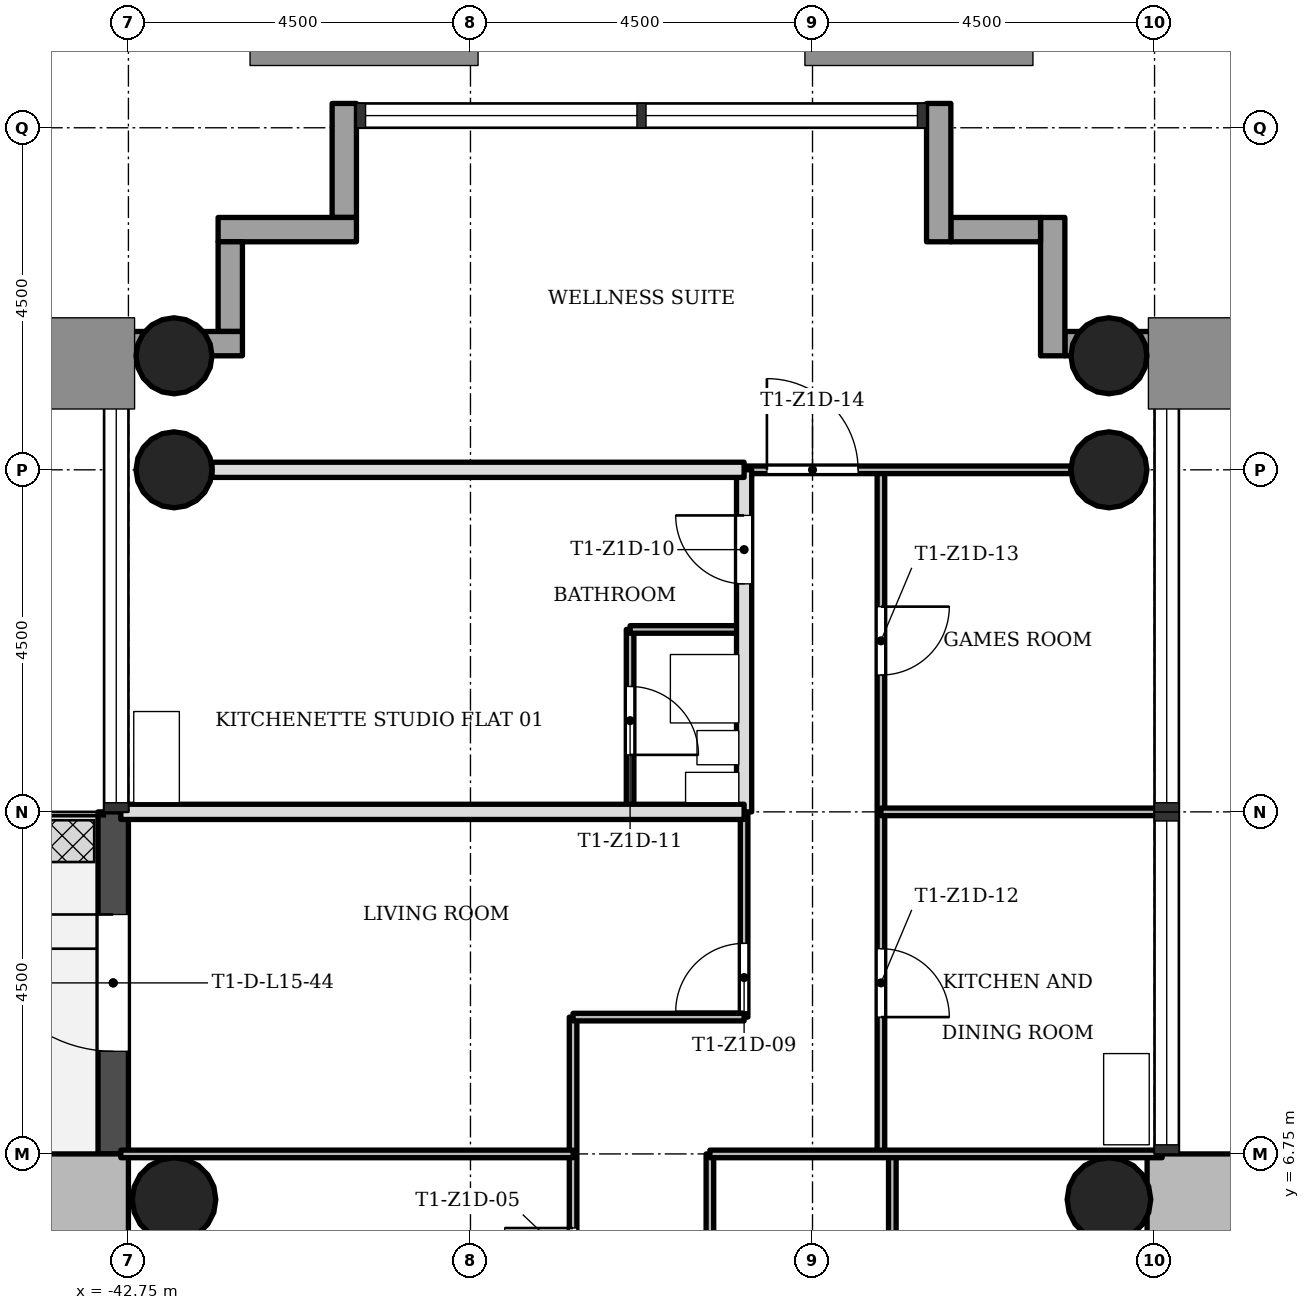
"""IFC4 building model, lengths in metres.
Left out: names, types, materials, properties, quantities, classifications, styles, units other than length and angle.
Written with IfcOpenShell. Run it as: python <this file> out.ifc"""

import sys

from ifc_helpers import new_model, si_unit, direction, frame, frame_2d, origin, origin_2d, place, context, subcontext, project, spatial, rectangle, hollow_circle, extrude, element, fill, save


model = new_model("IFC4")
c1 = context("Model", 3, precision=1e-05, world=origin(), true_north=direction((0.0, 1.0)))
c2 = subcontext(c1, "Body", "Model", "MODEL_VIEW")
j1 = project(units=[si_unit("LENGTHUNIT", "METRE"), si_unit("PLANEANGLEUNIT", "RADIAN")], contexts=[c1])
p1 = place(None, origin())
s1 = spatial("IfcSite", under=j1, at=p1, CompositionType="ELEMENT")
p2 = place(p1, origin())
s2 = spatial("IfcBuilding", under=s1, at=p2, CompositionType="ELEMENT")
p3 = place(p2, frame((0.0, 0.0, 58.5)))
s3 = spatial("IfcBuildingStorey", under=s2, at=p3, CompositionType="ELEMENT", Elevation=58.5)
p4 = place(p3, frame((-21.35, 6.2, 0.0), z_axis=(0.0, 0.0, 1.0), x_axis=(-1.0, 0.0, 0.0)))
e1 = element("IfcWall", 1, at=p4, inside=s3, PredefinedType="SHEAR", context=c2, shape_type="SweptSolid", body=[
    extrude(rectangle(XDim=7.998, YDim=1.1, at=frame_2d((3.999, 0.0))), origin(), (0.0, 0.0, 1.0), 3.4),
])
p5 = place(p3, frame((-43.3, -5.65, 0.0), z_axis=(0.0, 0.0, 1.0), x_axis=(0.0, 1.0, 0.0)))
e2 = element("IfcWall", 2, at=p5, inside=s3, PredefinedType="SHEAR", context=c2, shape_type="SweptSolid", body=[
    extrude(rectangle(XDim=12.4, YDim=1.1, at=frame_2d((6.2, 0.0))), origin(), (0.0, 0.0, 1.0), 3.4),
])
p6 = place(p5, frame((4.75, 0.0, 0.0)))
e3 = element("IfcOpeningElement", 3, at=p6, cuts=e2, PredefinedType="OPENING", context=c2, shape_type="SweptSolid", body=[
    extrude(rectangle(XDim=1.8, YDim=2.1, at=frame_2d((0.9, 1.05))), frame((0.0, 0.56, 0.0), z_axis=(0.0, -1.0, 0.0), x_axis=(1.0, 0.0, 0.0)), (0.0, 0.0, 1.0), 1.12),
])
for number, where, z_axis, x_axis in (
    (4, (-29.85, 15.75, 0.0), (0.0, 0.0, 1.0), (1.0, 0.0, 0.0)),
    (5, (-42.15, 15.75, 0.0), (0.0, 0.0, 1.0), (1.0, 0.0, 0.0)),
    (6, (-29.85, 17.25, 0.0), (0.0, 0.0, 1.0), (1.0, 0.0, 0.0)),
    (7, (-42.15, 17.25, 0.0), (0.0, 0.0, 1.0), (1.0, 0.0, 0.0)),
):
    element("IfcColumn", number, at=place(p3, frame(where, z_axis=z_axis, x_axis=x_axis)), inside=s3, PredefinedType="COLUMN", context=c2, shape_type="SweptSolid", body=[
        extrude(hollow_circle(Radius=0.5, WallThickness=0.036, at=origin_2d()), origin(), (0.0, 0.0, 1.0), 3.4),
    ])
for number, where, z_axis, x_axis in (
    (8, (-29.85, 6.15, 0.0), (0.0, 0.0, 1.0), (1.0, 0.0, 0.0)),
    (9, (-42.15, 6.15, 0.0), (0.0, 0.0, 1.0), (1.0, 0.0, 0.0)),
):
    element("IfcColumn", number, at=place(p3, frame(where, z_axis=z_axis, x_axis=x_axis)), inside=s3, PredefinedType="COLUMN", context=c2, shape_type="SweptSolid", body=[
        extrude(hollow_circle(Radius=0.55, WallThickness=0.04, at=origin_2d()), origin(), (0.0, 0.0, 1.0), 3.4),
    ])
p7 = place(p3, frame((-28.93, 17.41, -0.3), z_axis=(0.0, 0.0, 1.0), x_axis=(-1.0, 0.0, 0.0)))
e10 = element("IfcWall", 10, at=p7, inside=s3, PredefinedType="STANDARD", context=c2, shape_type="SweptSolid", body=[
    extrude(rectangle(XDim=1.5, YDim=0.32, at=frame_2d((0.75, 0.0))), origin(), (0.0, 0.0, 1.0), 3.4),
])
p8 = place(p3, frame((-30.59, 17.25, -0.3), z_axis=(0.0, 0.0, 1.0), x_axis=(0.0, 1.0, 0.0)))
e11 = element("IfcWall", 11, at=p8, inside=s3, PredefinedType="STANDARD", context=c2, shape_type="SweptSolid", body=[
    extrude(rectangle(XDim=1.82, YDim=0.32, at=frame_2d((0.91, 0.0))), origin(), (0.0, 0.0, 1.0), 3.4),
])
p9 = place(p3, frame((-30.75, 18.91, -0.3), z_axis=(0.0, 0.0, 1.0), x_axis=(-1.0, 0.0, 0.0)))
e12 = element("IfcWall", 12, at=p9, inside=s3, PredefinedType="STANDARD", context=c2, shape_type="SweptSolid", body=[
    extrude(rectangle(XDim=1.18, YDim=0.32, at=frame_2d((0.59, 0.0))), origin(), (0.0, 0.0, 1.0), 3.4),
])
p10 = place(p3, frame((-32.09, 18.75, -0.3), z_axis=(0.0, 0.0, 1.0), x_axis=(0.0, 1.0, 0.0)))
e13 = element("IfcWall", 13, at=p10, inside=s3, PredefinedType="STANDARD", context=c2, shape_type="SweptSolid", body=[
    extrude(rectangle(XDim=1.82, YDim=0.32, at=frame_2d((0.91, 0.0))), origin(), (0.0, 0.0, 1.0), 3.4),
])
p11 = place(p3, frame((-39.91, 20.57, -0.3), z_axis=(0.0, 0.0, 1.0), x_axis=(0.0, -1.0, 0.0)))
e14 = element("IfcWall", 14, at=p11, inside=s3, PredefinedType="STANDARD", context=c2, shape_type="SweptSolid", body=[
    extrude(rectangle(XDim=1.5, YDim=0.32, at=frame_2d((0.75, 0.0))), origin(), (0.0, 0.0, 1.0), 3.4),
])
p12 = place(p3, frame((-39.75, 18.91, -0.3), z_axis=(0.0, 0.0, 1.0), x_axis=(-1.0, 0.0, 0.0)))
e15 = element("IfcWall", 15, at=p12, inside=s3, PredefinedType="STANDARD", context=c2, shape_type="SweptSolid", body=[
    extrude(rectangle(XDim=1.82, YDim=0.32, at=frame_2d((0.91, 0.0))), origin(), (0.0, 0.0, 1.0), 3.4),
])
p13 = place(p3, frame((-41.41, 18.75, -0.3), z_axis=(0.0, 0.0, 1.0), x_axis=(0.0, -1.0, 0.0)))
e16 = element("IfcWall", 16, at=p13, inside=s3, PredefinedType="STANDARD", context=c2, shape_type="SweptSolid", body=[
    extrude(rectangle(XDim=1.18, YDim=0.32, at=frame_2d((0.59, 0.0))), origin(), (0.0, 0.0, 1.0), 3.4),
])
p14 = place(p3, frame((-41.25, 17.41, -0.3), z_axis=(0.0, 0.0, 1.0), x_axis=(-1.0, 0.0, 0.0)))
e17 = element("IfcWall", 17, at=p14, inside=s3, PredefinedType="STANDARD", context=c2, shape_type="SweptSolid", body=[
    extrude(rectangle(XDim=1.82, YDim=0.32, at=frame_2d((0.91, 0.0))), origin(), (0.0, 0.0, 1.0), 3.4),
])
p15 = place(p3, frame((-42.95, 11.25, -0.02), z_axis=(0.0, 0.0, 1.0), x_axis=(0.0, -1.0, 0.0)))
e18 = element("IfcWall", 18, at=p15, inside=s3, PredefinedType="STANDARD", context=c2, shape_type="SweptSolid", body=[
    extrude(rectangle(XDim=4.5, YDim=0.4, at=frame_2d((2.25, 0.0))), origin(), (0.0, 0.0, 1.0), 3.12),
])
p16 = place(p15, frame((1.35, 0.0, 0.02)))
e19 = element("IfcOpeningElement", 19, at=p16, cuts=e18, PredefinedType="OPENING", context=c2, shape_type="SweptSolid", body=[
    extrude(rectangle(XDim=1.8, YDim=2.1, at=frame_2d((0.9, 1.05))), frame((0.0, 0.21, 0.0), z_axis=(0.0, -1.0, 0.0), x_axis=(1.0, 0.0, 0.0)), (0.0, 0.0, 1.0), 0.42),
])
p17 = place(p3, frame((-36.9, 1.5, 0.0), z_axis=(0.0, 0.0, 1.0), x_axis=(0.0, 1.0, 0.0)))
e20 = element("IfcWall", 20, at=p17, inside=s3, PredefinedType="PARTITIONING", context=c2, shape_type="SweptSolid", body=[
    extrude(rectangle(XDim=7.05, YDim=0.1, at=frame_2d((3.525, 0.0))), origin(), (0.0, 0.0, 1.0), 3.0),
])
p18 = place(p17, frame((0.75, 0.0, 0.0)))
e21 = element("IfcOpeningElement", 21, at=p18, cuts=e20, PredefinedType="OPENING", context=c2, shape_type="SweptSolid", body=[
    extrude(rectangle(XDim=0.9, YDim=2.1, at=frame_2d((0.45, 1.05))), frame((0.0, 0.06, 0.0), z_axis=(0.0, -1.0, 0.0), x_axis=(1.0, 0.0, 0.0)), (0.0, 0.0, 1.0), 0.12),
])
p19 = place(p17, frame((3.375, 0.0, 0.0)))
e22 = element("IfcOpeningElement", 22, at=p19, cuts=e20, PredefinedType="OPENING", context=c2, shape_type="SweptSolid", body=[
    extrude(rectangle(XDim=0.9, YDim=2.1, at=frame_2d((0.45, 1.05))), frame((0.0, 0.06, 0.0), z_axis=(0.0, -1.0, 0.0), x_axis=(1.0, 0.0, 0.0)), (0.0, 0.0, 1.0), 0.12),
])
p20 = place(p3, frame((-36.15, 11.25, 0.0), z_axis=(0.0, 0.0, 1.0), x_axis=(0.0, 1.0, 0.0)))
e23 = element("IfcWall", 23, at=p20, inside=s3, PredefinedType="PARTITIONING", context=c2, shape_type="SweptSolid", body=[
    extrude(rectangle(XDim=2.4, YDim=0.1, at=frame_2d((1.2, 0.0))), origin(), (0.0, 0.0, 1.0), 3.0),
])
p21 = place(p20, frame((0.75, 0.0, 0.0)))
e24 = element("IfcOpeningElement", 24, at=p21, cuts=e23, PredefinedType="OPENING", context=c2, shape_type="SweptSolid", body=[
    extrude(rectangle(XDim=0.9, YDim=2.1, at=frame_2d((0.45, 1.05))), frame((0.0, 0.06, 0.0), z_axis=(0.0, -1.0, 0.0), x_axis=(1.0, 0.0, 0.0)), (0.0, 0.0, 1.0), 0.12),
])
p22 = place(p3, frame((-35.1, 1.5, 0.0), z_axis=(0.0, 0.0, 1.0), x_axis=(0.0, 1.0, 0.0)))
e25 = element("IfcWall", 25, at=p22, inside=s3, PredefinedType="PARTITIONING", context=c2, shape_type="SweptSolid", body=[
    extrude(rectangle(XDim=5.25, YDim=0.1, at=frame_2d((2.625, 0.0))), origin(), (0.0, 0.0, 1.0), 3.0),
])
p23 = place(p22, frame((2.175, 0.0, 0.0)))
e26 = element("IfcOpeningElement", 26, at=p23, cuts=e25, PredefinedType="OPENING", context=c2, shape_type="SweptSolid", body=[
    extrude(rectangle(XDim=0.9, YDim=2.1, at=frame_2d((0.45, 1.05))), frame((0.0, 0.06, 0.0), z_axis=(0.0, -1.0, 0.0), x_axis=(1.0, 0.0, 0.0)), (0.0, 0.0, 1.0), 0.12),
])
p24 = place(p3, frame((-34.65, 8.55, 0.0), z_axis=(0.0, 0.0, 1.0), x_axis=(0.0, 1.0, 0.0)))
e27 = element("IfcWall", 27, at=p24, inside=s3, PredefinedType="PARTITIONING", context=c2, shape_type="SweptSolid", body=[
    extrude(rectangle(XDim=2.7, YDim=0.1, at=frame_2d((1.35, 0.0))), origin(), (0.0, 0.0, 1.0), 3.0),
])
p25 = place(p24, frame((0.07, 0.0, 0.0)))
e28 = element("IfcOpeningElement", 28, at=p25, cuts=e27, PredefinedType="OPENING", context=c2, shape_type="SweptSolid", body=[
    extrude(rectangle(XDim=0.9, YDim=2.1, at=frame_2d((0.45, 1.05))), frame((0.0, 0.06, 0.0), z_axis=(0.0, -1.0, 0.0), x_axis=(1.0, 0.0, 0.0)), (0.0, 0.0, 1.0), 0.12),
])
p26 = place(p3, frame((-34.65, 11.25, 0.0), z_axis=(0.0, 0.0, 1.0), x_axis=(0.0, 1.0, 0.0)))
e29 = element("IfcWall", 29, at=p26, inside=s3, PredefinedType="SOLIDWALL", context=c2, shape_type="SweptSolid", body=[
    extrude(rectangle(XDim=4.5, YDim=0.2, at=frame_2d((2.25, 0.0))), origin(), (0.0, 0.0, 1.0), 3.0),
])
p27 = place(p26, frame((3.0, 0.0, 0.0)))
e30 = element("IfcOpeningElement", 30, at=p27, cuts=e29, PredefinedType="OPENING", context=c2, shape_type="SweptSolid", body=[
    extrude(rectangle(XDim=0.9, YDim=2.1, at=frame_2d((0.45, 1.05))), frame((0.0, 0.11, 0.0), z_axis=(0.0, -1.0, 0.0), x_axis=(1.0, 0.0, 0.0)), (0.0, 0.0, 1.0), 0.22),
])
p28 = place(p3, frame((-32.85, 6.75, 0.0), z_axis=(0.0, 0.0, 1.0), x_axis=(0.0, 1.0, 0.0)))
e31 = element("IfcWall", 31, at=p28, inside=s3, PredefinedType="PARTITIONING", context=c2, shape_type="SweptSolid", body=[
    extrude(rectangle(XDim=9.0, YDim=0.1, at=frame_2d((4.5, 0.0))), origin(), (0.0, 0.0, 1.0), 3.0),
])
p29 = place(p28, frame((1.8, 0.0, 0.0)))
e32 = element("IfcOpeningElement", 32, at=p29, cuts=e31, PredefinedType="OPENING", context=c2, shape_type="SweptSolid", body=[
    extrude(rectangle(XDim=0.9, YDim=2.1, at=frame_2d((0.45, 1.05))), frame((0.0, 0.06, 0.0), z_axis=(0.0, -1.0, 0.0), x_axis=(1.0, 0.0, 0.0)), (0.0, 0.0, 1.0), 0.12),
])
p30 = place(p28, frame((6.3, 0.0, 0.0)))
e33 = element("IfcOpeningElement", 33, at=p30, cuts=e31, PredefinedType="OPENING", context=c2, shape_type="SweptSolid", body=[
    extrude(rectangle(XDim=0.9, YDim=2.1, at=frame_2d((0.45, 1.05))), frame((0.0, 0.06, 0.0), z_axis=(0.0, -1.0, 0.0), x_axis=(1.0, 0.0, 0.0)), (0.0, 0.0, 1.0), 0.12),
])
p31 = place(p3, frame((-32.7, 1.5, 0.0), z_axis=(0.0, 0.0, 1.0), x_axis=(0.0, 1.0, 0.0)))
e34 = element("IfcWall", 34, at=p31, inside=s3, PredefinedType="PARTITIONING", context=c2, shape_type="SweptSolid", body=[
    extrude(rectangle(XDim=5.25, YDim=0.1, at=frame_2d((2.625, 0.0))), origin(), (0.0, 0.0, 1.0), 3.0),
])
for number, where, z_axis, x_axis in (
    (35, (-42.85, 6.75, 0.0), (0.0, 0.0, 1.0), (1.0, 0.0, 0.0)),
    (36, (-35.1, 6.75, 0.0), (0.0, 0.0, 1.0), (1.0, 0.0, 0.0)),
):
    element("IfcWall", number, at=place(p3, frame(where, z_axis=z_axis, x_axis=x_axis)), inside=s3, PredefinedType="PARTITIONING", context=c2, shape_type="SweptSolid", body=[
        extrude(rectangle(XDim=5.95, YDim=0.1, at=frame_2d((2.975, 0.0))), origin(), (0.0, 0.0, 1.0), 3.0),
    ])
p32 = place(p3, frame((-36.9, 8.55, 0.0), z_axis=(0.0, 0.0, 1.0), x_axis=(1.0, 0.0, 0.0)))
e37 = element("IfcWall", 37, at=p32, inside=s3, PredefinedType="PARTITIONING", context=c2, shape_type="SweptSolid", body=[
    extrude(rectangle(XDim=2.25, YDim=0.1, at=frame_2d((1.125, 0.0))), origin(), (0.0, 0.0, 1.0), 3.0),
])
p33 = place(p3, frame((-32.85, 11.25, 0.0), z_axis=(0.0, 0.0, 1.0), x_axis=(1.0, 0.0, 0.0)))
e38 = element("IfcWall", 38, at=p33, inside=s3, PredefinedType="PARTITIONING", context=c2, shape_type="SweptSolid", body=[
    extrude(rectangle(XDim=3.7, YDim=0.1, at=frame_2d((1.85, 0.0))), origin(), (0.0, 0.0, 1.0), 3.0),
])
p34 = place(p3, frame((-42.85, 11.25, 0.0), z_axis=(0.0, 0.0, 1.0), x_axis=(1.0, 0.0, 0.0)))
e39 = element("IfcWall", 39, at=p34, inside=s3, PredefinedType="SOLIDWALL", context=c2, shape_type="SweptSolid", body=[
    extrude(rectangle(XDim=8.2, YDim=0.2, at=frame_2d((4.1, 0.0))), origin(), (0.0, 0.0, 1.0), 3.0),
])
p35 = place(p3, frame((-36.15, 13.65, 0.0), z_axis=(0.0, 0.0, 1.0), x_axis=(1.0, 0.0, 0.0)))
e40 = element("IfcWall", 40, at=p35, inside=s3, PredefinedType="PARTITIONING", context=c2, shape_type="SweptSolid", body=[
    extrude(rectangle(XDim=1.5, YDim=0.1, at=frame_2d((0.75, 0.0))), origin(), (0.0, 0.0, 1.0), 3.0),
])
p36 = place(p3, frame((-34.65, 15.75, 0.0), z_axis=(0.0, 0.0, 1.0), x_axis=(1.0, 0.0, 0.0)))
e41 = element("IfcWall", 41, at=p36, inside=s3, PredefinedType="PARTITIONING", context=c2, shape_type="SweptSolid", body=[
    extrude(rectangle(XDim=4.3, YDim=0.1, at=frame_2d((2.15, 0.0))), origin(), (0.0, 0.0, 1.0), 3.0),
])
p37 = place(p36, frame((0.3, 0.0, 0.0)))
e42 = element("IfcOpeningElement", 42, at=p37, cuts=e41, PredefinedType="OPENING", context=c2, shape_type="SweptSolid", body=[
    extrude(rectangle(XDim=1.2, YDim=2.1, at=frame_2d((0.6, 1.05))), frame((0.0, 0.06, 0.0), z_axis=(0.0, -1.0, 0.0), x_axis=(1.0, 0.0, 0.0)), (0.0, 0.0, 1.0), 0.12),
])
p38 = place(p3, frame((-41.65, 15.75, 0.0), z_axis=(0.0, 0.0, 1.0), x_axis=(1.0, 0.0, 0.0)))
e43 = element("IfcWall", 43, at=p38, inside=s3, PredefinedType="SOLIDWALL", context=c2, shape_type="SweptSolid", body=[
    extrude(rectangle(XDim=7.0, YDim=0.2, at=frame_2d((3.5, 0.0))), origin(), (0.0, 0.0, 1.0), 3.0),
])
p39 = place(p16, origin())
e44 = element("IfcDoor", 44, at=p39, inside=s3, OperationType="SINGLE_SWING_LEFT", PredefinedType="DOOR", context=c2, shape_type="SweptSolid", body=[
    extrude(rectangle(XDim=1.8, YDim=2.1, at=frame_2d((0.9, 1.05))), frame((0.0, 0.025, 0.0), z_axis=(0.0, -1.0, 0.0), x_axis=(1.0, 0.0, 0.0)), (0.0, 0.0, 1.0), 0.05),
])
fill(e19, e44)
p40 = place(p19, origin())
e45 = element("IfcDoor", 45, at=p40, inside=s3, OperationType="SINGLE_SWING_LEFT", PredefinedType="DOOR", context=c2, shape_type="SweptSolid", body=[
    extrude(rectangle(XDim=0.9, YDim=2.1, at=frame_2d((0.45, 1.05))), frame((0.0, 0.025, 0.0), z_axis=(0.0, -1.0, 0.0), x_axis=(1.0, 0.0, 0.0)), (0.0, 0.0, 1.0), 0.05),
])
fill(e22, e45)
p41 = place(p25, origin())
e46 = element("IfcDoor", 46, at=p41, inside=s3, OperationType="SINGLE_SWING_RIGHT", PredefinedType="DOOR", context=c2, shape_type="SweptSolid", body=[
    extrude(rectangle(XDim=0.9, YDim=2.1, at=frame_2d((0.45, 1.05))), frame((0.0, 0.025, 0.0), z_axis=(0.0, -1.0, 0.0), x_axis=(1.0, 0.0, 0.0)), (0.0, 0.0, 1.0), 0.05),
])
fill(e28, e46)
p42 = place(p27, origin())
e47 = element("IfcDoor", 47, at=p42, inside=s3, OperationType="SINGLE_SWING_LEFT", PredefinedType="DOOR", context=c2, shape_type="SweptSolid", body=[
    extrude(rectangle(XDim=0.9, YDim=2.1, at=frame_2d((0.45, 1.05))), frame((0.0, 0.025, 0.0), z_axis=(0.0, -1.0, 0.0), x_axis=(1.0, 0.0, 0.0)), (0.0, 0.0, 1.0), 0.05),
])
fill(e30, e47)
p43 = place(p21, origin())
e48 = element("IfcDoor", 48, at=p43, inside=s3, OperationType="SINGLE_SWING_LEFT", PredefinedType="DOOR", context=c2, shape_type="SweptSolid", body=[
    extrude(rectangle(XDim=0.9, YDim=2.1, at=frame_2d((0.45, 1.05))), frame((0.0, 0.025, 0.0), z_axis=(0.0, -1.0, 0.0), x_axis=(1.0, 0.0, 0.0)), (0.0, 0.0, 1.0), 0.05),
])
fill(e24, e48)
p44 = place(p29, origin())
e49 = element("IfcDoor", 49, at=p44, inside=s3, OperationType="SINGLE_SWING_LEFT", PredefinedType="DOOR", context=c2, shape_type="SweptSolid", body=[
    extrude(rectangle(XDim=0.9, YDim=2.1, at=frame_2d((0.45, 1.05))), frame((0.0, 0.025, 0.0), z_axis=(0.0, -1.0, 0.0), x_axis=(1.0, 0.0, 0.0)), (0.0, 0.0, 1.0), 0.05),
])
fill(e32, e49)
p45 = place(p30, origin())
e50 = element("IfcDoor", 50, at=p45, inside=s3, OperationType="SINGLE_SWING_RIGHT", PredefinedType="DOOR", context=c2, shape_type="SweptSolid", body=[
    extrude(rectangle(XDim=0.9, YDim=2.1, at=frame_2d((0.45, 1.05))), frame((0.0, 0.025, 0.0), z_axis=(0.0, -1.0, 0.0), x_axis=(1.0, 0.0, 0.0)), (0.0, 0.0, 1.0), 0.05),
])
fill(e33, e50)
p46 = place(p37, origin())
e51 = element("IfcDoor", 51, at=p46, inside=s3, OperationType="SINGLE_SWING_RIGHT", PredefinedType="DOOR", context=c2, shape_type="SweptSolid", body=[
    extrude(rectangle(XDim=1.2, YDim=2.1, at=frame_2d((0.6, 1.05))), frame((0.0, 0.025, 0.0), z_axis=(0.0, -1.0, 0.0), x_axis=(1.0, 0.0, 0.0)), (0.0, 0.0, 1.0), 0.05),
])
fill(e42, e51)
save(model, sys.argv[1])
